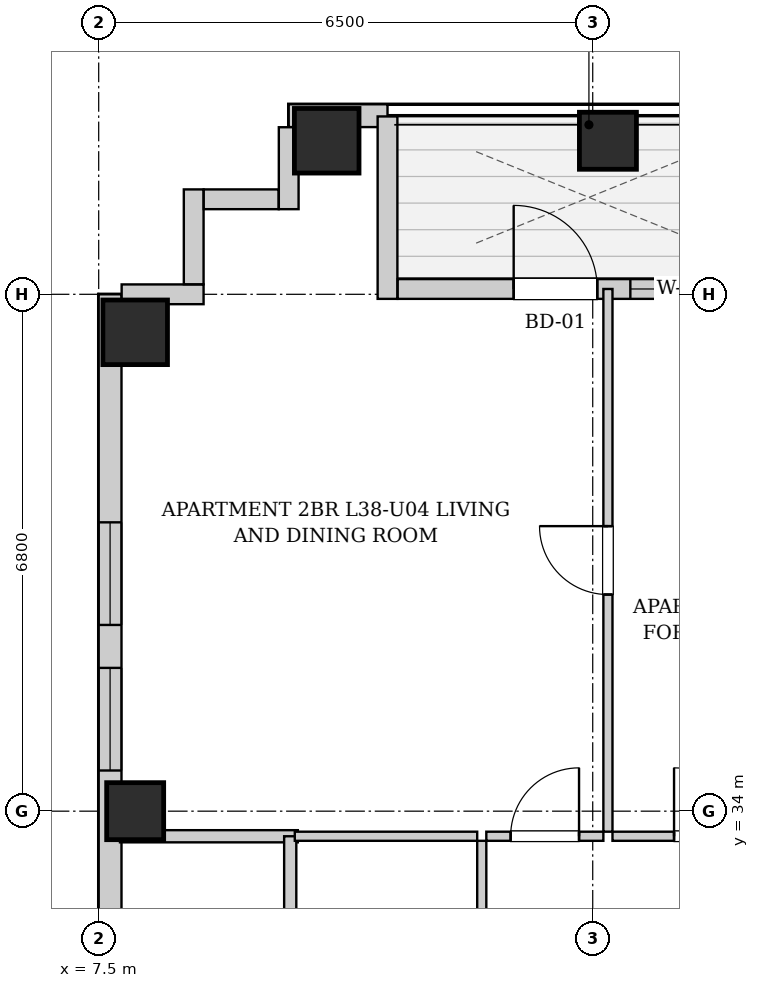
"""IFC4 building model, lengths in metres.
Left out: names, types, materials, properties, quantities, classifications, styles, units other than length and angle.
Written with IfcOpenShell. Run it as: python <this file> out.ifc"""

import sys

from ifc_helpers import new_model, si_unit, direction, frame, frame_2d, origin, origin_2d, place, context, subcontext, project, spatial, rectangle, extrude, element, fill, save


model = new_model("IFC4")
c1 = context("Model", 3, precision=1e-05, world=origin(), true_north=direction((0.0, 1.0)))
c2 = subcontext(c1, "Body", "Model", "MODEL_VIEW")
j1 = project(units=[si_unit("LENGTHUNIT", "METRE"), si_unit("PLANEANGLEUNIT", "RADIAN")], contexts=[c1])
p1 = place(None, origin())
s1 = spatial("IfcSite", under=j1, at=p1, CompositionType="ELEMENT")
p2 = place(p1, origin())
s2 = spatial("IfcBuilding", under=s1, at=p2, CompositionType="ELEMENT")
p3 = place(p2, frame((0.0, 0.0, 134.15)))
s3 = spatial("IfcBuildingStorey", under=s2, at=p3, CompositionType="ELEMENT", Elevation=134.15)
p4 = place(p3, frame((10.5, 42.82, 0.0), z_axis=(0.0, 0.0, 1.0), x_axis=(1.0, 0.0, 0.0)))
e1 = element("IfcColumn", 1, at=p4, inside=s3, PredefinedType="COLUMN", context=c2, shape_type="SweptSolid", body=[
    extrude(rectangle(XDim=0.85, YDim=0.85, at=origin_2d()), origin(), (0.0, 0.0, 1.0), 3.25),
])
for number, where, z_axis, x_axis in (
    (2, (14.2, 42.82, 0.0), (0.0, 0.0, 1.0), (1.0, 0.0, 0.0)),
    (3, (7.98, 34.0, 0.0), (0.0, 0.0, 1.0), (1.0, 0.0, 0.0)),
):
    element("IfcColumn", number, at=place(p3, frame(where, z_axis=z_axis, x_axis=x_axis)), inside=s3, PredefinedType="COLUMN", context=c2, shape_type="SweptSolid", body=[
        extrude(rectangle(XDim=0.75, YDim=0.75, at=origin_2d()), origin(), (0.0, 0.0, 1.0), 3.25),
    ])
p5 = place(p3, frame((7.98, 40.3, 0.0), z_axis=(0.0, 0.0, 1.0), x_axis=(1.0, 0.0, 0.0)))
e4 = element("IfcColumn", 4, at=p5, inside=s3, PredefinedType="COLUMN", context=c2, shape_type="SweptSolid", body=[
    extrude(rectangle(XDim=0.85, YDim=0.85, at=origin_2d()), origin(), (0.0, 0.0, 1.0), 3.25),
])
p6 = place(p3, frame((10.0, 43.15, 0.0), z_axis=(0.0, 0.0, 1.0), x_axis=(1.0, 0.0, 0.0)))
e5 = element("IfcWall", 5, at=p6, inside=s3, PredefinedType="SOLIDWALL", context=c2, shape_type="SweptSolid", body=[
    extrude(rectangle(XDim=1.3, YDim=0.3, at=frame_2d((0.65, 0.0))), origin(), (0.0, 0.0, 1.0), 2.99),
])
p7 = place(p3, frame((11.3, 43.14, 0.0), z_axis=(0.0, 0.0, 1.0), x_axis=(0.0, -1.0, 0.0)))
e6 = element("IfcWall", 6, at=p7, inside=s3, PredefinedType="SOLIDWALL", context=c2, shape_type="SweptSolid", body=[
    extrude(rectangle(XDim=2.4, YDim=0.26, at=frame_2d((1.2, 0.0))), origin(), (0.0, 0.0, 1.0), 2.99),
])
p8 = place(p3, frame((11.434, 40.87, 0.0), z_axis=(0.0, 0.0, 1.0), x_axis=(1.0, 0.0, 0.0)))
e7 = element("IfcWall", 7, at=p8, inside=s3, PredefinedType="SOLIDWALL", context=c2, shape_type="SweptSolid", body=[
    extrude(rectangle(XDim=5.032, YDim=0.26, at=frame_2d((2.516, 0.0))), origin(), (0.0, 0.0, 1.0), 2.99),
])
p9 = place(p8, frame((1.526, 0.0, 0.0)))
e8 = element("IfcOpeningElement", 8, at=p9, cuts=e7, PredefinedType="OPENING", context=c2, shape_type="SweptSolid", body=[
    extrude(rectangle(XDim=1.1, YDim=2.0, at=frame_2d((0.55, 1.0))), frame((0.0, 0.14, 0.0), z_axis=(0.0, -1.0, 0.0), x_axis=(1.0, 0.0, 0.0)), (0.0, 0.0, 1.0), 0.28),
])
p10 = place(p8, frame((3.061, 0.0, 0.85)))
e9 = element("IfcOpeningElement", 9, at=p10, cuts=e7, PredefinedType="OPENING", context=c2, shape_type="SweptSolid", body=[
    extrude(rectangle(XDim=1.35, YDim=1.65, at=frame_2d((0.675, 0.825))), frame((0.0, 0.14, 0.0), z_axis=(0.0, -1.0, 0.0), x_axis=(1.0, 0.0, 0.0)), (0.0, 0.0, 1.0), 0.28),
])
p11 = place(p3, frame((7.65, 6.3, 0.0), z_axis=(0.0, 0.0, 1.0), x_axis=(0.0, 1.0, 0.0)))
e10 = element("IfcWall", 10, at=p11, inside=s3, PredefinedType="SOLIDWALL", context=c2, shape_type="SweptSolid", body=[
    extrude(rectangle(XDim=34.5, YDim=0.3, at=frame_2d((17.25, 0.0))), origin(), (0.0, 0.0, 1.0), 2.99),
])
p12 = place(p11, frame((30.15, 0.0, 0.55)))
e11 = element("IfcOpeningElement", 11, at=p12, cuts=e10, PredefinedType="OPENING", context=c2, shape_type="SweptSolid", body=[
    extrude(rectangle(XDim=1.35, YDim=1.2, at=frame_2d((0.675, 0.6))), frame((0.0, 0.16, 0.0), z_axis=(0.0, -1.0, 0.0), x_axis=(1.0, 0.0, 0.0)), (0.0, 0.0, 1.0), 0.32),
])
p13 = place(p11, frame((28.235, 0.0, 0.55)))
e12 = element("IfcOpeningElement", 12, at=p13, cuts=e10, PredefinedType="OPENING", context=c2, shape_type="SweptSolid", body=[
    extrude(rectangle(XDim=1.35, YDim=1.2, at=frame_2d((0.675, 0.6))), frame((0.0, 0.16, 0.0), z_axis=(0.0, -1.0, 0.0), x_axis=(1.0, 0.0, 0.0)), (0.0, 0.0, 1.0), 0.32),
])
p14 = place(p11, frame((10.35, 0.0, 0.55)))
e13 = element("IfcOpeningElement", 13, at=p14, cuts=e10, PredefinedType="OPENING", context=c2, shape_type="SweptSolid", body=[
    extrude(rectangle(XDim=1.35, YDim=1.2, at=frame_2d((0.675, 0.6))), frame((0.0, 0.16, 0.0), z_axis=(0.0, -1.0, 0.0), x_axis=(1.0, 0.0, 0.0)), (0.0, 0.0, 1.0), 0.32),
])
p15 = place(p11, frame((19.725, 0.0, 0.55)))
e14 = element("IfcOpeningElement", 14, at=p15, cuts=e10, PredefinedType="OPENING", context=c2, shape_type="SweptSolid", body=[
    extrude(rectangle(XDim=1.35, YDim=1.2, at=frame_2d((0.675, 0.6))), frame((0.0, 0.16, 0.0), z_axis=(0.0, -1.0, 0.0), x_axis=(1.0, 0.0, 0.0)), (0.0, 0.0, 1.0), 0.32),
])
p16 = place(p3, frame((7.802, 40.8, 0.0), z_axis=(0.0, 0.0, 1.0), x_axis=(1.0, 0.0, 0.0)))
e15 = element("IfcWall", 15, at=p16, inside=s3, PredefinedType="SOLIDWALL", context=c2, shape_type="SweptSolid", body=[
    extrude(rectangle(XDim=1.078, YDim=0.26, at=frame_2d((0.539, 0.0))), origin(), (0.0, 0.0, 1.0), 2.99),
])
p17 = place(p3, frame((8.75, 40.932, 0.0), z_axis=(0.0, 0.0, 1.0), x_axis=(0.0, 1.0, 0.0)))
e16 = element("IfcWall", 16, at=p17, inside=s3, PredefinedType="SOLIDWALL", context=c2, shape_type="SweptSolid", body=[
    extrude(rectangle(XDim=1.248, YDim=0.26, at=frame_2d((0.624, 0.0))), origin(), (0.0, 0.0, 1.0), 2.99),
])
p18 = place(p3, frame((8.882, 42.05, 0.0), z_axis=(0.0, 0.0, 1.0), x_axis=(1.0, 0.0, 0.0)))
e17 = element("IfcWall", 17, at=p18, inside=s3, PredefinedType="SOLIDWALL", context=c2, shape_type="SweptSolid", body=[
    extrude(rectangle(XDim=0.986, YDim=0.26, at=frame_2d((0.493, 0.0))), origin(), (0.0, 0.0, 1.0), 2.99),
])
p19 = place(p3, frame((10.0, 41.92, 0.0), z_axis=(0.0, 0.0, 1.0), x_axis=(0.0, 1.0, 0.0)))
e18 = element("IfcWall", 18, at=p19, inside=s3, PredefinedType="SOLIDWALL", context=c2, shape_type="SweptSolid", body=[
    extrude(rectangle(XDim=1.078, YDim=0.26, at=frame_2d((0.539, 0.0))), origin(), (0.0, 0.0, 1.0), 2.99),
])
p20 = place(p3, frame((7.78, 33.67, 0.0), z_axis=(0.0, 0.0, 1.0), x_axis=(1.0, 0.0, 0.0)))
e19 = element("IfcWall", 19, at=p20, inside=s3, PredefinedType="PARTITIONING", context=c2, shape_type="SweptSolid", body=[
    extrude(rectangle(XDim=2.34, YDim=0.16, at=frame_2d((1.17, 0.0))), origin(), (0.0, 0.0, 1.0), 2.99),
])
p21 = place(p3, frame((10.02, 30.76, 0.0), z_axis=(0.0, 0.0, 1.0), x_axis=(0.0, 1.0, 0.0)))
e20 = element("IfcWall", 20, at=p21, inside=s3, PredefinedType="PARTITIONING", context=c2, shape_type="SweptSolid", body=[
    extrude(rectangle(XDim=2.91, YDim=0.16, at=frame_2d((1.455, 0.0))), origin(), (0.0, 0.0, 1.0), 2.99),
])
p22 = place(p3, frame((12.54, 30.76, 0.0), z_axis=(0.0, 0.0, 1.0), x_axis=(0.0, 1.0, 0.0)))
e21 = element("IfcWall", 21, at=p22, inside=s3, PredefinedType="PARTITIONING", context=c2, shape_type="SweptSolid", body=[
    extrude(rectangle(XDim=2.85, YDim=0.12, at=frame_2d((1.425, 0.0))), origin(), (0.0, 0.0, 1.0), 2.99),
])
p23 = place(p22, frame((0.995, 0.0, 0.0)))
e22 = element("IfcOpeningElement", 22, at=p23, cuts=e21, PredefinedType="OPENING", context=c2, shape_type="SweptSolid", body=[
    extrude(rectangle(XDim=0.86, YDim=2.05, at=frame_2d((0.43, 1.025))), frame((0.0, 0.07, 0.0), z_axis=(0.0, -1.0, 0.0), x_axis=(1.0, 0.0, 0.0)), (0.0, 0.0, 1.0), 0.14),
])
p24 = place(p3, frame((10.08, 33.67, 0.0), z_axis=(0.0, 0.0, 1.0), x_axis=(1.0, 0.0, 0.0)))
e23 = element("IfcWall", 23, at=p24, inside=s3, PredefinedType="PARTITIONING", context=c2, shape_type="SweptSolid", body=[
    extrude(rectangle(XDim=2.4, YDim=0.12, at=frame_2d((1.2, 0.0))), origin(), (0.0, 0.0, 1.0), 2.99),
])
p25 = place(p3, frame((12.6, 33.67, 0.0), z_axis=(0.0, 0.0, 1.0), x_axis=(1.0, 0.0, 0.0)))
e24 = element("IfcWall", 24, at=p25, inside=s3, PredefinedType="PARTITIONING", context=c2, shape_type="SweptSolid", body=[
    extrude(rectangle(XDim=1.54, YDim=0.12, at=frame_2d((0.77, 0.0))), origin(), (0.0, 0.0, 1.0), 2.99),
])
p26 = place(p25, frame((0.32, 0.0, 0.0)))
e25 = element("IfcOpeningElement", 25, at=p26, cuts=e24, PredefinedType="OPENING", context=c2, shape_type="SweptSolid", body=[
    extrude(rectangle(XDim=0.9, YDim=2.05, at=frame_2d((0.45, 1.025))), frame((0.0, 0.07, 0.0), z_axis=(0.0, -1.0, 0.0), x_axis=(1.0, 0.0, 0.0)), (0.0, 0.0, 1.0), 0.14),
])
p27 = place(p3, frame((14.26, 33.67, 0.0), z_axis=(0.0, 0.0, 1.0), x_axis=(1.0, 0.0, 0.0)))
e26 = element("IfcWall", 26, at=p27, inside=s3, PredefinedType="PARTITIONING", context=c2, shape_type="SweptSolid", body=[
    extrude(rectangle(XDim=2.52, YDim=0.12, at=frame_2d((1.26, 0.0))), origin(), (0.0, 0.0, 1.0), 2.99),
])
p28 = place(p27, frame((0.81, 0.0, 0.0)))
e27 = element("IfcOpeningElement", 27, at=p28, cuts=e26, PredefinedType="OPENING", context=c2, shape_type="SweptSolid", body=[
    extrude(rectangle(XDim=0.9, YDim=2.05, at=frame_2d((0.45, 1.025))), frame((0.0, 0.07, 0.0), z_axis=(0.0, -1.0, 0.0), x_axis=(1.0, 0.0, 0.0)), (0.0, 0.0, 1.0), 0.14),
])
p29 = place(p3, frame((14.2, 33.73, 0.0), z_axis=(0.0, 0.0, 1.0), x_axis=(0.0, 1.0, 0.0)))
e28 = element("IfcWall", 28, at=p29, inside=s3, PredefinedType="PARTITIONING", context=c2, shape_type="SweptSolid", body=[
    extrude(rectangle(XDim=7.14, YDim=0.12, at=frame_2d((3.57, 0.0))), origin(), (0.0, 0.0, 1.0), 2.99),
])
p30 = place(p29, frame((3.12, 0.0, 0.0)))
e29 = element("IfcOpeningElement", 29, at=p30, cuts=e28, PredefinedType="OPENING", context=c2, shape_type="SweptSolid", body=[
    extrude(rectangle(XDim=0.9, YDim=2.05, at=frame_2d((0.45, 1.025))), frame((0.0, 0.07, 0.0), z_axis=(0.0, -1.0, 0.0), x_axis=(1.0, 0.0, 0.0)), (0.0, 0.0, 1.0), 0.14),
])
p31 = place(p26, origin())
e30 = element("IfcDoor", 30, at=p31, inside=s3, OperationType="SINGLE_SWING_RIGHT", PredefinedType="DOOR", context=c2, shape_type="SweptSolid", body=[
    extrude(rectangle(XDim=0.9, YDim=2.05, at=frame_2d((0.45, 1.025))), frame((0.0, 0.025, 0.0), z_axis=(0.0, -1.0, 0.0), x_axis=(1.0, 0.0, 0.0)), (0.0, 0.0, 1.0), 0.05),
])
fill(e25, e30)
p32 = place(p28, origin())
e31 = element("IfcDoor", 31, at=p32, inside=s3, OperationType="SINGLE_SWING_LEFT", PredefinedType="DOOR", context=c2, shape_type="SweptSolid", body=[
    extrude(rectangle(XDim=0.9, YDim=2.05, at=frame_2d((0.45, 1.025))), frame((0.0, 0.025, 0.0), z_axis=(0.0, -1.0, 0.0), x_axis=(1.0, 0.0, 0.0)), (0.0, 0.0, 1.0), 0.05),
])
fill(e27, e31)
p33 = place(p30, origin())
e32 = element("IfcDoor", 32, at=p33, inside=s3, OperationType="SINGLE_SWING_RIGHT", PredefinedType="DOOR", context=c2, shape_type="SweptSolid", body=[
    extrude(rectangle(XDim=0.9, YDim=2.05, at=frame_2d((0.45, 1.025))), frame((0.0, 0.025, 0.0), z_axis=(0.0, -1.0, 0.0), x_axis=(1.0, 0.0, 0.0)), (0.0, 0.0, 1.0), 0.05),
])
fill(e29, e32)
p34 = place(p9, origin())
e33 = element("IfcDoor", 33, at=p34, inside=s3, OperationType="SINGLE_SWING_LEFT", PredefinedType="DOOR", context=c2, shape_type="SweptSolid", body=[
    extrude(rectangle(XDim=1.1, YDim=2.0, at=frame_2d((0.55, 1.0))), frame((0.0, 0.025, 0.0), z_axis=(0.0, -1.0, 0.0), x_axis=(1.0, 0.0, 0.0)), (0.0, 0.0, 1.0), 0.05),
])
fill(e8, e33)
p35 = place(p12, origin())
e34 = element("IfcWindow", 34, at=p35, inside=s3, PartitioningType="SINGLE_PANEL", PredefinedType="WINDOW", context=c2, shape_type="SweptSolid", body=[
    extrude(rectangle(XDim=1.35, YDim=1.2, at=frame_2d((0.675, 0.6))), frame((0.0, 0.03, 0.0), z_axis=(0.0, -1.0, 0.0), x_axis=(1.0, 0.0, 0.0)), (0.0, 0.0, 1.0), 0.06),
])
fill(e11, e34)
p36 = place(p13, origin())
e35 = element("IfcWindow", 35, at=p36, inside=s3, PartitioningType="SINGLE_PANEL", PredefinedType="WINDOW", context=c2, shape_type="SweptSolid", body=[
    extrude(rectangle(XDim=1.35, YDim=1.2, at=frame_2d((0.675, 0.6))), frame((0.0, 0.03, 0.0), z_axis=(0.0, -1.0, 0.0), x_axis=(1.0, 0.0, 0.0)), (0.0, 0.0, 1.0), 0.06),
])
fill(e12, e35)
p37 = place(p10, origin())
e36 = element("IfcWindow", 36, at=p37, inside=s3, PartitioningType="SINGLE_PANEL", PredefinedType="WINDOW", context=c2, shape_type="SweptSolid", body=[
    extrude(rectangle(XDim=1.35, YDim=1.65, at=frame_2d((0.675, 0.825))), frame((0.0, 0.03, 0.0), z_axis=(0.0, -1.0, 0.0), x_axis=(1.0, 0.0, 0.0)), (0.0, 0.0, 1.0), 0.06),
])
fill(e9, e36)
save(model, sys.argv[1])
